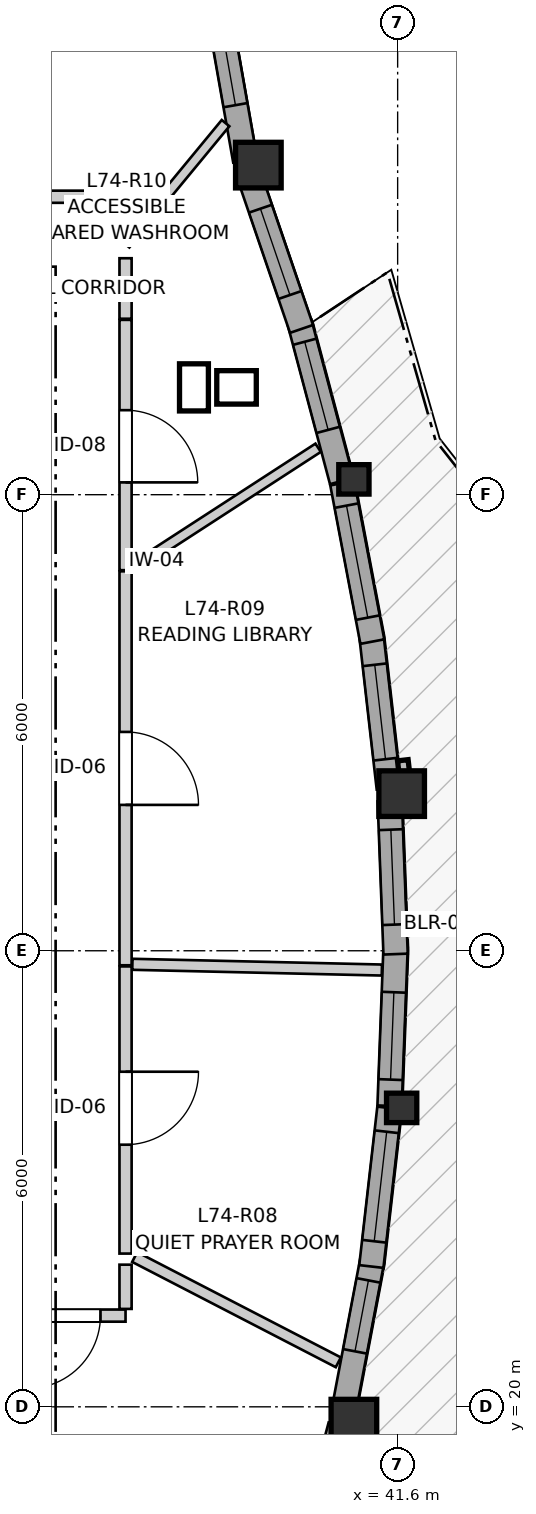
"""IFC4 building model, lengths in metres.
Left out: names, types, materials, properties, quantities, classifications, styles, units other than length and angle.
Written with IfcOpenShell. Run it as: python <this file> out.ifc"""

import sys

from ifc_helpers import new_model, si_unit, direction, frame, frame_2d, origin, origin_2d, place, context, subcontext, project, spatial, rectangle, i_section, extrude, source, transform, mapped, element, fill, save


model = new_model("IFC4")
c1 = context("Model", 3, precision=1e-05, world=origin(), true_north=direction((0.0, 1.0)))
c2 = subcontext(c1, "Body", "Model", "MODEL_VIEW")
j1 = project(units=[si_unit("LENGTHUNIT", "METRE"), si_unit("PLANEANGLEUNIT", "RADIAN")], contexts=[c1])
p1 = place(None, origin())
s1 = spatial("IfcSite", under=j1, at=p1, CompositionType="ELEMENT")
p2 = place(p1, origin())
s2 = spatial("IfcBuilding", under=s1, at=p2, CompositionType="ELEMENT")
p3 = place(p2, frame((0.0, 0.0, 246.8)))
s3 = spatial("IfcBuildingStorey", under=s2, at=p3, CompositionType="ELEMENT", Elevation=246.8)
m1 = source(origin(), c2, "Body", "SweptSolid", [
    extrude(rectangle(XDim=0.6, YDim=0.6, at=origin_2d()), origin(), (0.0, 0.0, 1.0), 2.96),
])
p4 = place(p3, frame((41.024, 19.798, 0.0), z_axis=(0.0, 0.0, 1.0), x_axis=(1.0, 0.0, 0.0)))
e1 = element("IfcColumn", 1, at=p4, inside=s3, PredefinedType="COLUMN", context=c2, shape_type="MappedRepresentation", body=[
    mapped(m1, transform((0.0, 0.0, 0.0), x_axis=(1.0, 0.0, 0.0), y_axis=(0.0, 1.0, 0.0), z_axis=(0.0, 0.0, 1.0), scale=1.0)),
])
m2 = source(origin(), c2, "Body", "SweptSolid", [
    extrude(i_section(OverallWidth=0.398, OverallDepth=0.387, WebThickness=0.019, FlangeThickness=0.03, FilletRadius=0.015, at=origin_2d()), origin(), (0.0, 0.0, 1.0), 2.96),
])
p5 = place(p3, frame((41.653, 23.933, 0.0), z_axis=(0.0, 0.0, 1.0), x_axis=(1.0, 0.0, 0.0)))
e2 = element("IfcColumn", 2, at=p5, inside=s3, PredefinedType="PILASTER", context=c2, shape_type="MappedRepresentation", body=[
    mapped(m2, transform((0.0, 0.0, 0.0), x_axis=(1.0, 0.0, 0.0), y_axis=(0.0, 1.0, 0.0), z_axis=(0.0, 0.0, 1.0), scale=1.0)),
])
p6 = place(p3, frame((41.653, 28.067, 0.0), z_axis=(0.0, 0.0, 1.0), x_axis=(1.0, 0.0, 0.0)))
e3 = element("IfcColumn", 3, at=p6, inside=s3, PredefinedType="COLUMN", context=c2, shape_type="MappedRepresentation", body=[
    mapped(m1, transform((0.0, 0.0, 0.0), x_axis=(1.0, 0.0, 0.0), y_axis=(0.0, 1.0, 0.0), z_axis=(0.0, 0.0, 1.0), scale=1.0)),
])
p7 = place(p3, frame((41.024, 32.202, 0.0), z_axis=(0.0, 0.0, 1.0), x_axis=(1.0, 0.0, 0.0)))
e4 = element("IfcColumn", 4, at=p7, inside=s3, PredefinedType="PILASTER", context=c2, shape_type="MappedRepresentation", body=[
    mapped(m2, transform((0.0, 0.0, 0.0), x_axis=(1.0, 0.0, 0.0), y_axis=(0.0, 1.0, 0.0), z_axis=(0.0, 0.0, 1.0), scale=1.0)),
])
p8 = place(p3, frame((39.768, 36.336, 0.0), z_axis=(0.0, 0.0, 1.0), x_axis=(1.0, 0.0, 0.0)))
e5 = element("IfcColumn", 5, at=p8, inside=s3, PredefinedType="COLUMN", context=c2, shape_type="MappedRepresentation", body=[
    mapped(m1, transform((0.0, 0.0, 0.0), x_axis=(1.0, 0.0, 0.0), y_axis=(0.0, 1.0, 0.0), z_axis=(0.0, 0.0, 1.0), scale=1.0)),
])
p9 = place(p3, frame((40.31, 17.736, 0.0), z_axis=(0.0, 0.0, 1.0), x_axis=(0.257094755125, 0.966386199657, 0.0)))
e6 = element("IfcWall", 6, at=p9, inside=s3, PredefinedType="SOLIDWALL", context=c2, shape_type="SweptSolid", body=[
    extrude(rectangle(XDim=2.087, YDim=0.32, at=frame_2d((1.043, 0.0))), origin(), (0.0, 0.0, 1.0), 2.58),
])
p10 = place(p9, frame((0.24, 0.0, 0.0)))
e7 = element("IfcOpeningElement", 7, at=p10, cuts=e6, PredefinedType="OPENING", context=c2, shape_type="SweptSolid", body=[
    extrude(rectangle(XDim=1.0, YDim=2.1, at=frame_2d((0.5, 1.05))), frame((0.0, 0.17, 0.0), z_axis=(0.0, -1.0, 0.0), x_axis=(1.0, 0.0, 0.0)), (0.0, 0.0, 1.0), 0.34),
])
p11 = place(p3, frame((40.884, 19.917, 0.0), z_axis=(0.0, 0.0, 1.0), x_axis=(0.186658349395, 0.98242488802, 0.0)))
e8 = element("IfcWall", 8, at=p11, inside=s3, PredefinedType="SOLIDWALL", context=c2, shape_type="SweptSolid", body=[
    extrude(rectangle(XDim=2.052, YDim=0.32, at=frame_2d((1.026, 0.0))), origin(), (0.0, 0.0, 1.0), 2.58),
])
p12 = place(p11, frame((0.828, 0.0, 0.82)))
e9 = element("IfcOpeningElement", 9, at=p12, cuts=e8, PredefinedType="OPENING", context=c2, shape_type="SweptSolid", body=[
    extrude(rectangle(XDim=0.95, YDim=1.35, at=frame_2d((0.475, 0.675))), frame((0.0, 0.17, 0.0), z_axis=(0.0, -1.0, 0.0), x_axis=(1.0, 0.0, 0.0)), (0.0, 0.0, 1.0), 0.34),
])
p13 = place(p3, frame((41.254, 21.846, 0.0), z_axis=(0.0, 0.0, 1.0), x_axis=(0.113303807423, 0.993560389319, 0.0)))
e10 = element("IfcWall", 10, at=p13, inside=s3, PredefinedType="SOLIDWALL", context=c2, shape_type="SweptSolid", body=[
    extrude(rectangle(XDim=2.099, YDim=0.32, at=frame_2d((1.049, 0.0))), origin(), (0.0, 0.0, 1.0), 2.58),
])
p14 = place(p13, frame((0.334, 0.0, 0.82)))
e11 = element("IfcOpeningElement", 11, at=p14, cuts=e10, PredefinedType="OPENING", context=c2, shape_type="SweptSolid", body=[
    extrude(rectangle(XDim=1.45, YDim=1.25, at=frame_2d((0.725, 0.625))), frame((0.0, 0.17, 0.0), z_axis=(0.0, -1.0, 0.0), x_axis=(1.0, 0.0, 0.0)), (0.0, 0.0, 1.0), 0.34),
])
p15 = place(p3, frame((41.494, 23.959, 0.0), z_axis=(0.0, 0.0, 1.0), x_axis=(0.038028678064, 0.999276648203, 0.0)))
e12 = element("IfcWall", 12, at=p15, inside=s3, PredefinedType="SOLIDWALL", context=c2, shape_type="SweptSolid", body=[
    extrude(rectangle(XDim=2.086, YDim=0.32, at=frame_2d((1.043, 0.0))), origin(), (0.0, 0.0, 1.0), 2.58),
])
p16 = place(p15, frame((0.346, 0.0, 0.82)))
e13 = element("IfcOpeningElement", 13, at=p16, cuts=e12, PredefinedType="OPENING", context=c2, shape_type="SweptSolid", body=[
    extrude(rectangle(XDim=1.15, YDim=1.2, at=frame_2d((0.575, 0.6))), frame((0.0, 0.17, 0.0), z_axis=(0.0, -1.0, 0.0), x_axis=(1.0, 0.0, 0.0)), (0.0, 0.0, 1.0), 0.34),
])
p17 = place(p3, frame((41.573, 25.956, 0.0), z_axis=(0.0, 0.0, 1.0), x_axis=(-0.038014663796, 0.999277181435, 0.0)))
e14 = element("IfcWall", 14, at=p17, inside=s3, PredefinedType="SOLIDWALL", context=c2, shape_type="SweptSolid", body=[
    extrude(rectangle(XDim=2.017, YDim=0.32, at=frame_2d((1.008, 0.0))), origin(), (0.0, 0.0, 1.0), 2.58),
])
p18 = place(p17, frame((0.388, 0.0, 0.82)))
e15 = element("IfcOpeningElement", 15, at=p18, cuts=e14, PredefinedType="OPENING", context=c2, shape_type="SweptSolid", body=[
    extrude(rectangle(XDim=1.25, YDim=1.35, at=frame_2d((0.625, 0.675))), frame((0.0, 0.17, 0.0), z_axis=(0.0, -1.0, 0.0), x_axis=(1.0, 0.0, 0.0)), (0.0, 0.0, 1.0), 0.34),
])
p19 = place(p3, frame((41.484, 28.138, 0.0), z_axis=(0.0, 0.0, 1.0), x_axis=(-0.113244511591, 0.993567149515, 0.0)))
e16 = element("IfcWall", 16, at=p19, inside=s3, PredefinedType="SOLIDWALL", context=c2, shape_type="SweptSolid", body=[
    extrude(rectangle(XDim=2.029, YDim=0.32, at=frame_2d((1.014, 0.0))), origin(), (0.0, 0.0, 1.0), 2.58),
])
p20 = place(p19, frame((0.384, 0.0, 0.82)))
e17 = element("IfcOpeningElement", 17, at=p20, cuts=e16, PredefinedType="OPENING", context=c2, shape_type="SweptSolid", body=[
    extrude(rectangle(XDim=1.25, YDim=1.35, at=frame_2d((0.625, 0.675))), frame((0.0, 0.17, 0.0), z_axis=(0.0, -1.0, 0.0), x_axis=(1.0, 0.0, 0.0)), (0.0, 0.0, 1.0), 0.34),
])
p21 = place(p3, frame((41.267, 30.067, 0.0), z_axis=(0.0, 0.0, 1.0), x_axis=(-0.186705057177, 0.982416012504, 0.0)))
e18 = element("IfcWall", 18, at=p21, inside=s3, PredefinedType="SOLIDWALL", context=c2, shape_type="SweptSolid", body=[
    extrude(rectangle(XDim=2.122, YDim=0.32, at=frame_2d((1.061, 0.0))), origin(), (0.0, 0.0, 1.0), 2.58),
])
p22 = place(p21, frame((0.321, 0.0, 0.82)))
e19 = element("IfcOpeningElement", 19, at=p22, cuts=e18, PredefinedType="OPENING", context=c2, shape_type="SweptSolid", body=[
    extrude(rectangle(XDim=1.5, YDim=1.45, at=frame_2d((0.75, 0.725))), frame((0.0, 0.17, 0.0), z_axis=(0.0, -1.0, 0.0), x_axis=(1.0, 0.0, 0.0)), (0.0, 0.0, 1.0), 0.34),
])
p23 = place(p3, frame((40.865, 32.18, 0.0), z_axis=(0.0, 0.0, 1.0), x_axis=(-0.257021579051, 0.966405664254, 0.0)))
e20 = element("IfcWall", 20, at=p23, inside=s3, PredefinedType="SOLIDWALL", context=c2, shape_type="SweptSolid", body=[
    extrude(rectangle(XDim=2.157, YDim=0.32, at=frame_2d((1.079, 0.0))), origin(), (0.0, 0.0, 1.0), 2.58),
])
p24 = place(p23, frame((0.696, 0.0, 0.82)))
e21 = element("IfcOpeningElement", 21, at=p24, cuts=e20, PredefinedType="OPENING", context=c2, shape_type="SweptSolid", body=[
    extrude(rectangle(XDim=1.2, YDim=1.45, at=frame_2d((0.6, 0.725))), frame((0.0, 0.17, 0.0), z_axis=(0.0, -1.0, 0.0), x_axis=(1.0, 0.0, 0.0)), (0.0, 0.0, 1.0), 0.34),
])
p25 = place(p3, frame((40.335, 34.181, 0.0), z_axis=(0.0, 0.0, 1.0), x_axis=(-0.323601383087, 0.946193502865, 0.0)))
e22 = element("IfcWall", 22, at=p25, inside=s3, PredefinedType="SOLIDWALL", context=c2, shape_type="SweptSolid", body=[
    extrude(rectangle(XDim=2.133, YDim=0.32, at=frame_2d((1.066, 0.0))), origin(), (0.0, 0.0, 1.0), 2.58),
])
p26 = place(p25, frame((0.471, 0.0, 0.82)))
e23 = element("IfcOpeningElement", 23, at=p26, cuts=e22, PredefinedType="OPENING", context=c2, shape_type="SweptSolid", body=[
    extrude(rectangle(XDim=1.2, YDim=1.45, at=frame_2d((0.6, 0.725))), frame((0.0, 0.17, 0.0), z_axis=(0.0, -1.0, 0.0), x_axis=(1.0, 0.0, 0.0)), (0.0, 0.0, 1.0), 0.34),
])
p27 = place(p3, frame((39.594, 36.397, 0.0), z_axis=(0.0, 0.0, 1.0), x_axis=(-0.173671780312, 0.984803590937, 0.0)))
e24 = element("IfcWall", 24, at=p27, inside=s3, PredefinedType="SOLIDWALL", context=c2, shape_type="SweptSolid", body=[
    extrude(rectangle(XDim=1.962, YDim=0.32, at=frame_2d((0.981, 0.0))), origin(), (0.0, 0.0, 1.0), 2.58),
])
p28 = place(p27, frame((0.739, 0.0, 0.82)))
e25 = element("IfcOpeningElement", 25, at=p28, cuts=e24, PredefinedType="OPENING", context=c2, shape_type="SweptSolid", body=[
    extrude(rectangle(XDim=0.95, YDim=1.35, at=frame_2d((0.475, 0.675))), frame((0.0, 0.17, 0.0), z_axis=(0.0, -1.0, 0.0), x_axis=(1.0, 0.0, 0.0)), (0.0, 0.0, 1.0), 0.34),
])
p29 = place(p3, frame((38.02, 30.992, 0.0), z_axis=(0.0, 0.0, 1.0), x_axis=(0.0, -1.0, 0.0)))
e26 = element("IfcWall", 26, at=p29, inside=s3, PredefinedType="PARTITIONING", context=c2, shape_type="SweptSolid", body=[
    extrude(rectangle(XDim=5.183, YDim=0.16, at=frame_2d((2.591, 0.0))), origin(), (0.0, 0.0, 1.0), 2.628),
])
p30 = place(p29, frame((2.113, 0.0, 0.0)))
e27 = element("IfcOpeningElement", 27, at=p30, cuts=e26, PredefinedType="OPENING", context=c2, shape_type="SweptSolid", body=[
    extrude(rectangle(XDim=0.96, YDim=2.1, at=frame_2d((0.48, 1.05))), frame((0.0, 0.09, 0.0), z_axis=(0.0, -1.0, 0.0), x_axis=(1.0, 0.0, 0.0)), (0.0, 0.0, 1.0), 0.18),
])
p31 = place(p3, frame((38.02, 25.794, 0.0), z_axis=(0.0, 0.0, 1.0), x_axis=(0.0, -1.0, 0.0)))
e28 = element("IfcWall", 28, at=p31, inside=s3, PredefinedType="PARTITIONING", context=c2, shape_type="SweptSolid", body=[
    extrude(rectangle(XDim=3.778, YDim=0.16, at=frame_2d((1.889, 0.0))), origin(), (0.0, 0.0, 1.0), 2.628),
])
p32 = place(p31, frame((1.385, 0.0, 0.0)))
e29 = element("IfcOpeningElement", 29, at=p32, cuts=e28, PredefinedType="OPENING", context=c2, shape_type="SweptSolid", body=[
    extrude(rectangle(XDim=0.96, YDim=2.1, at=frame_2d((0.48, 1.05))), frame((0.0, 0.09, 0.0), z_axis=(0.0, -1.0, 0.0), x_axis=(1.0, 0.0, 0.0)), (0.0, 0.0, 1.0), 0.18),
])
p33 = place(p3, frame((38.02, 34.3, 0.0), z_axis=(0.0, 0.0, 1.0), x_axis=(0.0, -1.0, 0.0)))
e30 = element("IfcWall", 30, at=p33, inside=s3, PredefinedType="PARTITIONING", context=c2, shape_type="SweptSolid", body=[
    extrude(rectangle(XDim=3.293, YDim=0.16, at=frame_2d((1.646, 0.0))), origin(), (0.0, 0.0, 1.0), 2.628),
])
p34 = place(p33, frame((1.188, 0.0, 0.0)))
e31 = element("IfcOpeningElement", 31, at=p34, cuts=e30, PredefinedType="OPENING", context=c2, shape_type="SweptSolid", body=[
    extrude(rectangle(XDim=0.95, YDim=2.1, at=frame_2d((0.475, 1.05))), frame((0.0, 0.09, 0.0), z_axis=(0.0, -1.0, 0.0), x_axis=(1.0, 0.0, 0.0)), (0.0, 0.0, 1.0), 0.18),
])
p35 = place(p3, frame((38.02, 21.2, 0.0), z_axis=(0.0, 0.0, 1.0), x_axis=(-1.0, 0.0, 0.0)))
e32 = element("IfcWall", 32, at=p35, inside=s3, PredefinedType="PARTITIONING", context=c2, shape_type="SweptSolid", body=[
    extrude(rectangle(XDim=1.612, YDim=0.16, at=frame_2d((0.806, 0.0))), origin(), (0.0, 0.0, 1.0), 2.96),
])
p36 = place(p35, frame((0.33, 0.0, 0.0)))
e33 = element("IfcOpeningElement", 33, at=p36, cuts=e32, PredefinedType="OPENING", context=c2, shape_type="SweptSolid", body=[
    extrude(rectangle(XDim=0.96, YDim=2.1, at=frame_2d((0.48, 1.05))), frame((0.0, 0.09, 0.0), z_axis=(0.0, -1.0, 0.0), x_axis=(1.0, 0.0, 0.0)), (0.0, 0.0, 1.0), 0.18),
])
p37 = place(p3, frame((38.11, 25.822, 0.0), z_axis=(0.0, 0.0, 1.0), x_axis=(0.999734335157, -0.023049058746, 0.0)))
e34 = element("IfcWall", 34, at=p37, inside=s3, PredefinedType="PARTITIONING", context=c2, shape_type="SweptSolid", body=[
    extrude(rectangle(XDim=3.284, YDim=0.145, at=frame_2d((1.642, 0.0))), origin(), (0.0, 0.0, 1.0), 2.96),
])
p38 = place(p3, frame((38.14, 21.971, 0.0), z_axis=(0.0, 0.0, 1.0), x_axis=(0.888273451666, -0.459315006357, 0.0)))
e35 = element("IfcWall", 35, at=p38, inside=s3, PredefinedType="PARTITIONING", context=c2, shape_type="SweptSolid", body=[
    extrude(rectangle(XDim=3.016, YDim=0.145, at=frame_2d((1.508, 0.0))), origin(), (0.0, 0.0, 1.0), 2.96),
])
p39 = place(p3, frame((38.142, 31.053, 0.0), z_axis=(0.0, 0.0, 1.0), x_axis=(0.839000059055, 0.544131326892, 0.0)))
e36 = element("IfcWall", 36, at=p39, inside=s3, PredefinedType="PARTITIONING", context=c2, shape_type="SweptSolid", body=[
    extrude(rectangle(XDim=2.875, YDim=0.13, at=frame_2d((1.438, 0.0))), origin(), (0.0, 0.0, 1.0), 2.96),
])
p40 = place(p3, frame((38.02, 35.294, 0.0), z_axis=(0.0, 0.0, 1.0), x_axis=(0.636518208935, 0.771261673943, 0.0)))
e37 = element("IfcWall", 37, at=p40, inside=s3, PredefinedType="PARTITIONING", context=c2, shape_type="SweptSolid", body=[
    extrude(rectangle(XDim=2.067, YDim=0.13, at=frame_2d((1.034, 0.0))), origin(), (0.0, 0.0, 1.0), 2.96),
])
p41 = place(p3, frame((36.415, 35.92, 0.0), z_axis=(0.0, 0.0, 1.0), x_axis=(1.0, 0.0, 0.0)))
e38 = element("IfcWall", 38, at=p41, inside=s3, PredefinedType="PARTITIONING", context=c2, shape_type="SweptSolid", body=[
    extrude(rectangle(XDim=1.605, YDim=0.16, at=frame_2d((0.802, 0.0))), origin(), (0.0, 0.0, 1.0), 2.598),
])
p42 = place(p3, frame((38.02, 34.315, 0.0), z_axis=(0.0, 0.0, 1.0), x_axis=(0.0, 1.0, 0.0)))
e39 = element("IfcWall", 39, at=p42, inside=s3, PredefinedType="PARTITIONING", context=c2, shape_type="SweptSolid", body=[
    extrude(rectangle(XDim=0.796, YDim=0.16, at=frame_2d((0.398, 0.0))), origin(), (0.0, 0.0, 1.0), 2.96),
])
p43 = place(p3, frame((38.02, 21.288, 0.0), z_axis=(0.0, 0.0, 1.0), x_axis=(0.0, 1.0, 0.0)))
e40 = element("IfcWall", 40, at=p43, inside=s3, PredefinedType="PARTITIONING", context=c2, shape_type="SweptSolid", body=[
    extrude(rectangle(XDim=0.582, YDim=0.16, at=frame_2d((0.291, 0.0))), origin(), (0.0, 0.0, 1.0), 2.628),
])
p44 = place(p3, frame((38.02, 35.423, 0.0), z_axis=(0.0, 0.0, 1.0), x_axis=(0.0, 1.0, 0.0)))
e41 = element("IfcWall", 41, at=p44, inside=s3, PredefinedType="PARTITIONING", context=c2, shape_type="SweptSolid", body=[
    extrude(rectangle(XDim=0.497, YDim=0.16, at=frame_2d((0.249, 0.0))), origin(), (0.0, 0.0, 1.0), 2.96),
])
m3 = source(origin(), c2, "Body", "SweptSolid", [
    extrude(rectangle(XDim=0.95, YDim=1.35, at=frame_2d((0.475, 0.675))), frame((0.0, 0.03, 0.0), z_axis=(0.0, -1.0, 0.0), x_axis=(1.0, 0.0, 0.0)), (0.0, 0.0, 1.0), 0.06),
])
p45 = place(p12, origin())
e42 = element("IfcWindow", 42, at=p45, inside=s3, PartitioningType="SINGLE_PANEL", PredefinedType="WINDOW", context=c2, shape_type="MappedRepresentation", body=[
    mapped(m3, transform((0.0, 0.0, 0.0), x_axis=(1.0, 0.0, 0.0), y_axis=(0.0, 1.0, 0.0), z_axis=(0.0, 0.0, 1.0), scale=1.0)),
])
fill(e9, e42)
m4 = source(origin(), c2, "Body", "SweptSolid", [
    extrude(rectangle(XDim=1.45, YDim=1.25, at=frame_2d((0.725, 0.625))), frame((0.0, 0.03, 0.0), z_axis=(0.0, -1.0, 0.0), x_axis=(1.0, 0.0, 0.0)), (0.0, 0.0, 1.0), 0.06),
])
p46 = place(p14, origin())
e43 = element("IfcWindow", 43, at=p46, inside=s3, PartitioningType="SINGLE_PANEL", PredefinedType="WINDOW", context=c2, shape_type="MappedRepresentation", body=[
    mapped(m4, transform((0.0, 0.0, 0.0), x_axis=(1.0, 0.0, 0.0), y_axis=(0.0, 1.0, 0.0), z_axis=(0.0, 0.0, 1.0), scale=1.0)),
])
fill(e11, e43)
m5 = source(origin(), c2, "Body", "SweptSolid", [
    extrude(rectangle(XDim=1.15, YDim=1.2, at=frame_2d((0.575, 0.6))), frame((0.0, 0.03, 0.0), z_axis=(0.0, -1.0, 0.0), x_axis=(1.0, 0.0, 0.0)), (0.0, 0.0, 1.0), 0.06),
])
p47 = place(p16, origin())
e44 = element("IfcWindow", 44, at=p47, inside=s3, PartitioningType="SINGLE_PANEL", PredefinedType="WINDOW", context=c2, shape_type="MappedRepresentation", body=[
    mapped(m5, transform((0.0, 0.0, 0.0), x_axis=(1.0, 0.0, 0.0), y_axis=(0.0, 1.0, 0.0), z_axis=(0.0, 0.0, 1.0), scale=1.0)),
])
fill(e13, e44)
m6 = source(origin(), c2, "Body", "SweptSolid", [
    extrude(rectangle(XDim=1.25, YDim=1.35, at=frame_2d((0.625, 0.675))), frame((0.0, 0.03, 0.0), z_axis=(0.0, -1.0, 0.0), x_axis=(1.0, 0.0, 0.0)), (0.0, 0.0, 1.0), 0.06),
])
p48 = place(p18, origin())
e45 = element("IfcWindow", 45, at=p48, inside=s3, PartitioningType="SINGLE_PANEL", PredefinedType="WINDOW", context=c2, shape_type="MappedRepresentation", body=[
    mapped(m6, transform((0.0, 0.0, 0.0), x_axis=(1.0, 0.0, 0.0), y_axis=(0.0, 1.0, 0.0), z_axis=(0.0, 0.0, 1.0), scale=1.0)),
])
fill(e15, e45)
p49 = place(p20, origin())
e46 = element("IfcWindow", 46, at=p49, inside=s3, PartitioningType="SINGLE_PANEL", PredefinedType="WINDOW", context=c2, shape_type="MappedRepresentation", body=[
    mapped(m6, transform((0.0, 0.0, 0.0), x_axis=(1.0, 0.0, 0.0), y_axis=(0.0, 1.0, 0.0), z_axis=(0.0, 0.0, 1.0), scale=1.0)),
])
fill(e17, e46)
m7 = source(origin(), c2, "Body", "SweptSolid", [
    extrude(rectangle(XDim=1.5, YDim=1.45, at=frame_2d((0.75, 0.725))), frame((0.0, 0.03, 0.0), z_axis=(0.0, -1.0, 0.0), x_axis=(1.0, 0.0, 0.0)), (0.0, 0.0, 1.0), 0.06),
])
p50 = place(p22, origin())
e47 = element("IfcWindow", 47, at=p50, inside=s3, PartitioningType="SINGLE_PANEL", PredefinedType="WINDOW", context=c2, shape_type="MappedRepresentation", body=[
    mapped(m7, transform((0.0, 0.0, 0.0), x_axis=(1.0, 0.0, 0.0), y_axis=(0.0, 1.0, 0.0), z_axis=(0.0, 0.0, 1.0), scale=1.0)),
])
fill(e19, e47)
m8 = source(origin(), c2, "Body", "SweptSolid", [
    extrude(rectangle(XDim=1.2, YDim=1.45, at=frame_2d((0.6, 0.725))), frame((0.0, 0.03, 0.0), z_axis=(0.0, -1.0, 0.0), x_axis=(1.0, 0.0, 0.0)), (0.0, 0.0, 1.0), 0.06),
])
p51 = place(p24, origin())
e48 = element("IfcWindow", 48, at=p51, inside=s3, PartitioningType="SINGLE_PANEL", PredefinedType="WINDOW", context=c2, shape_type="MappedRepresentation", body=[
    mapped(m8, transform((0.0, 0.0, 0.0), x_axis=(1.0, 0.0, 0.0), y_axis=(0.0, 1.0, 0.0), z_axis=(0.0, 0.0, 1.0), scale=1.0)),
])
fill(e21, e48)
p52 = place(p26, origin())
e49 = element("IfcWindow", 49, at=p52, inside=s3, PartitioningType="SINGLE_PANEL", PredefinedType="WINDOW", context=c2, shape_type="MappedRepresentation", body=[
    mapped(m8, transform((0.0, 0.0, 0.0), x_axis=(1.0, 0.0, 0.0), y_axis=(0.0, 1.0, 0.0), z_axis=(0.0, 0.0, 1.0), scale=1.0)),
])
fill(e23, e49)
p53 = place(p28, origin())
e50 = element("IfcWindow", 50, at=p53, inside=s3, PartitioningType="SINGLE_PANEL", PredefinedType="WINDOW", context=c2, shape_type="MappedRepresentation", body=[
    mapped(m3, transform((0.0, 0.0, 0.0), x_axis=(1.0, 0.0, 0.0), y_axis=(0.0, 1.0, 0.0), z_axis=(0.0, 0.0, 1.0), scale=1.0)),
])
fill(e25, e50)
m9 = source(origin(), c2, "Body", "SweptSolid", [
    extrude(rectangle(XDim=0.96, YDim=2.1, at=frame_2d((0.48, 1.05))), frame((0.0, 0.025, 0.0), z_axis=(0.0, -1.0, 0.0), x_axis=(1.0, 0.0, 0.0)), (0.0, 0.0, 1.0), 0.05),
])
p54 = place(p30, origin())
e51 = element("IfcDoor", 51, at=p54, inside=s3, OperationType="SINGLE_SWING_RIGHT", PredefinedType="DOOR", context=c2, shape_type="MappedRepresentation", body=[
    mapped(m9, transform((0.0, 0.0, 0.0), x_axis=(1.0, 0.0, 0.0), y_axis=(0.0, 1.0, 0.0), z_axis=(0.0, 0.0, 1.0), scale=1.0)),
])
fill(e27, e51)
p55 = place(p32, origin())
e52 = element("IfcDoor", 52, at=p55, inside=s3, OperationType="SINGLE_SWING_LEFT", PredefinedType="DOOR", context=c2, shape_type="MappedRepresentation", body=[
    mapped(m9, transform((0.0, 0.0, 0.0), x_axis=(1.0, 0.0, 0.0), y_axis=(0.0, 1.0, 0.0), z_axis=(0.0, 0.0, 1.0), scale=1.0)),
])
fill(e29, e52)
m10 = source(origin(), c2, "Body", "SweptSolid", [
    extrude(rectangle(XDim=0.95, YDim=2.1, at=frame_2d((0.475, 1.05))), frame((0.0, 0.025, 0.0), z_axis=(0.0, -1.0, 0.0), x_axis=(1.0, 0.0, 0.0)), (0.0, 0.0, 1.0), 0.05),
])
p56 = place(p34, origin())
e53 = element("IfcDoor", 53, at=p56, inside=s3, OperationType="SINGLE_SWING_RIGHT", PredefinedType="DOOR", context=c2, shape_type="MappedRepresentation", body=[
    mapped(m10, transform((0.0, 0.0, 0.0), x_axis=(1.0, 0.0, 0.0), y_axis=(0.0, 1.0, 0.0), z_axis=(0.0, 0.0, 1.0), scale=1.0)),
])
fill(e31, e53)
p57 = place(p36, origin())
e54 = element("IfcDoor", 54, at=p57, inside=s3, OperationType="SINGLE_SWING_RIGHT", PredefinedType="DOOR", context=c2, shape_type="MappedRepresentation", body=[
    mapped(m9, transform((0.0, 0.0, 0.0), x_axis=(1.0, 0.0, 0.0), y_axis=(0.0, 1.0, 0.0), z_axis=(0.0, 0.0, 1.0), scale=1.0)),
])
fill(e33, e54)
save(model, sys.argv[1])
